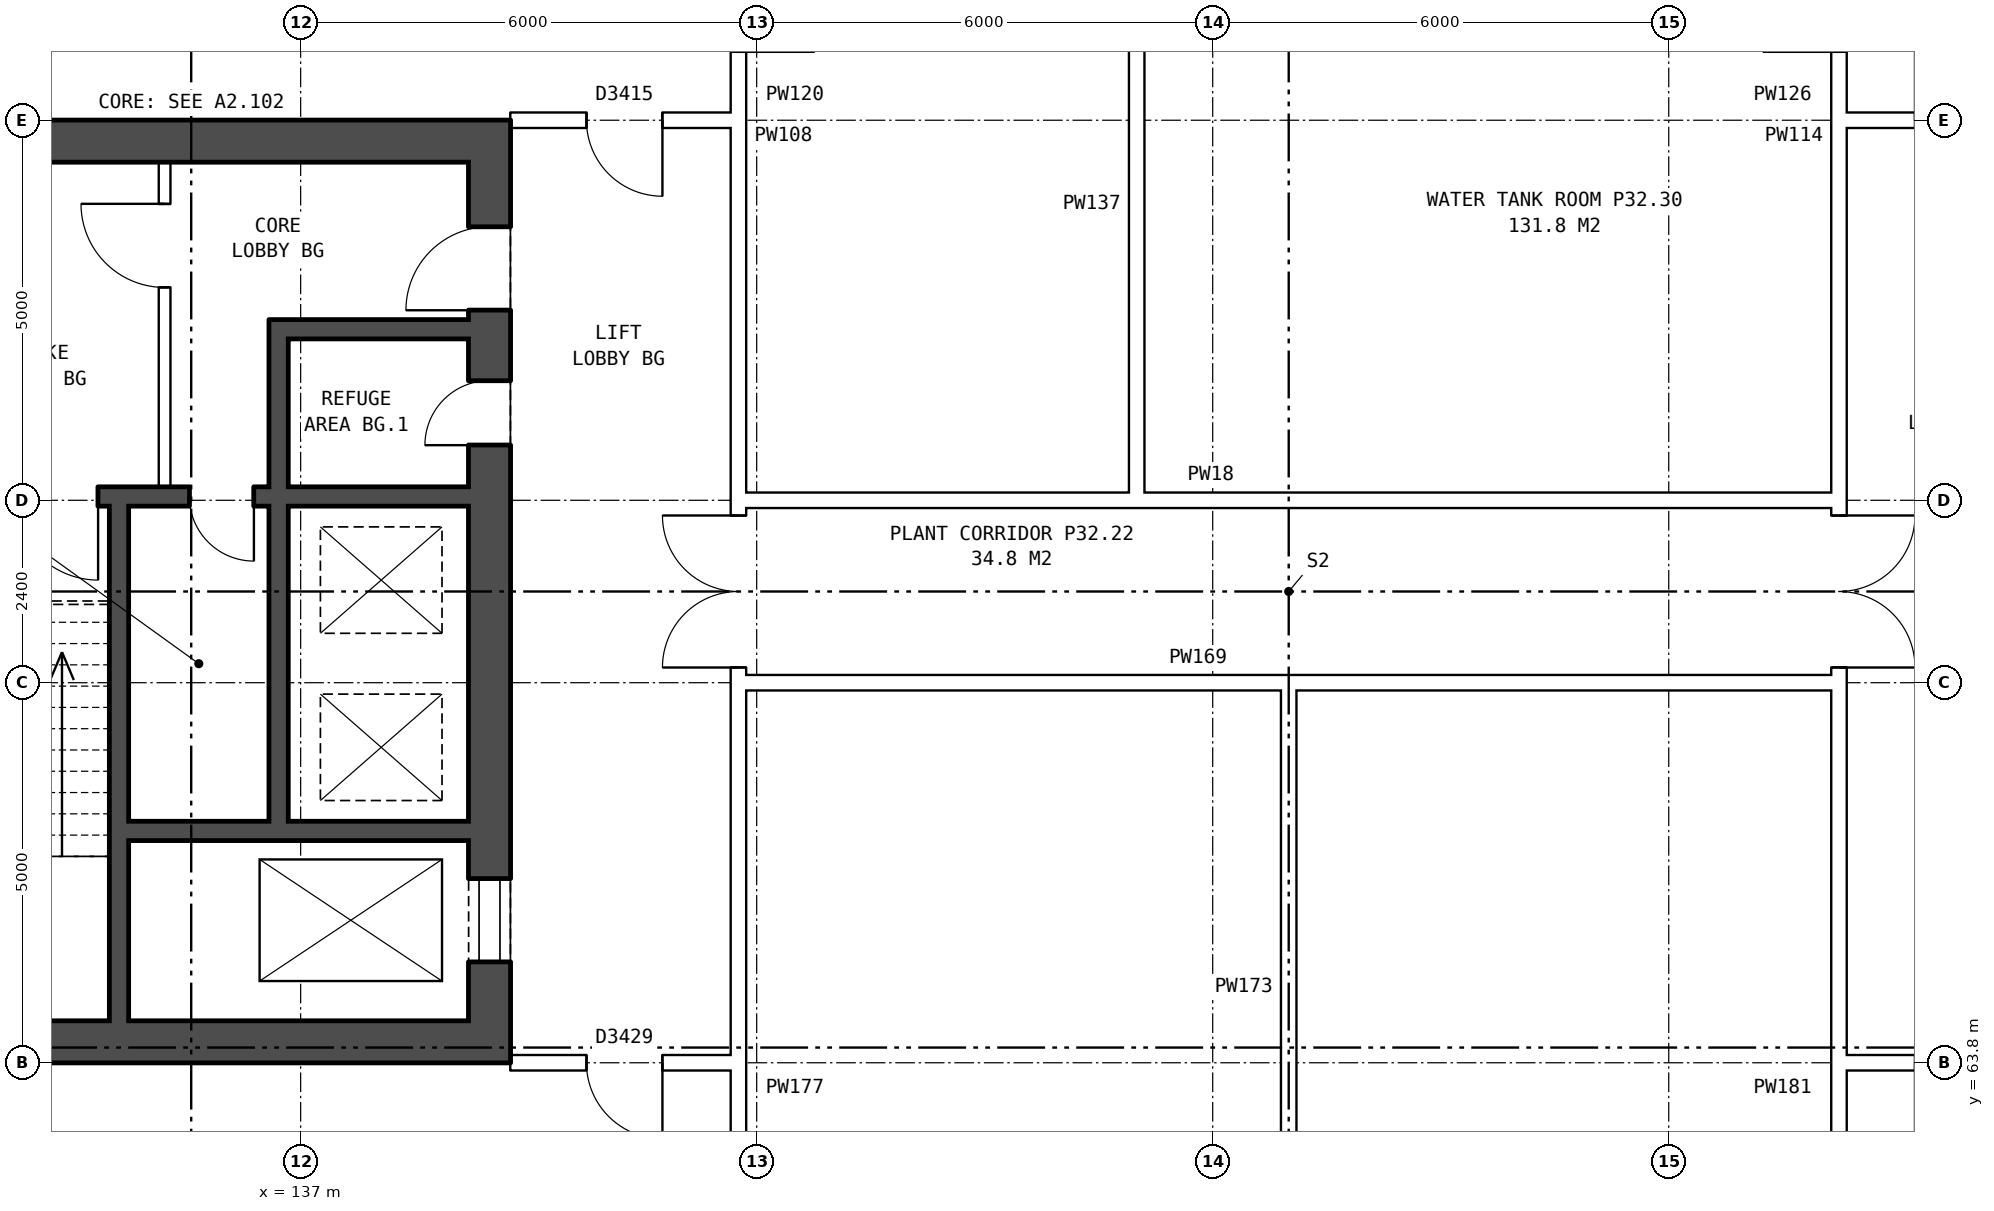
"""IFC4 building model, lengths in metres.
Left out: names, types, materials, properties, quantities, classifications, styles, units other than length and angle.
Written with IfcOpenShell. Run it as: python <this file> out.ifc"""

import sys

from ifc_helpers import new_model, si_unit, direction, frame, frame_2d, origin, place, context, subcontext, project, spatial, rectangle, extrude, element, fill, save


model = new_model("IFC4")
c1 = context("Model", 3, precision=1e-05, world=origin(), true_north=direction((0.0, 1.0)))
c2 = subcontext(c1, "Body", "Model", "MODEL_VIEW")
j1 = project(units=[si_unit("LENGTHUNIT", "METRE"), si_unit("PLANEANGLEUNIT", "RADIAN")], contexts=[c1])
p1 = place(None, origin())
s1 = spatial("IfcSite", under=j1, at=p1, CompositionType="ELEMENT")
p2 = place(p1, origin())
s2 = spatial("IfcBuilding", under=s1, at=p2, CompositionType="ELEMENT")
p3 = place(p2, frame((0.0, 0.0, 115.0)))
s3 = spatial("IfcBuildingStorey", under=s2, at=p3, CompositionType="ELEMENT", Elevation=115.0)
p4 = place(p3, frame((139.485, 63.8, 0.0), z_axis=(0.0, 0.0, 1.0), x_axis=(0.0, 1.0, 0.0)))
e1 = element("IfcWall", 1, at=p4, inside=s3, PredefinedType="SHEAR", context=c2, shape_type="SweptSolid", body=[
    extrude(rectangle(XDim=12.4, YDim=0.55, at=frame_2d((6.2, 0.0))), origin(), (0.0, 0.0, 1.0), 4.2),
])
p5 = place(p4, frame((1.325, 0.0, 0.0)))
e2 = element("IfcOpeningElement", 2, at=p5, cuts=e1, PredefinedType="OPENING", context=c2, shape_type="SweptSolid", body=[
    extrude(rectangle(XDim=1.1, YDim=2.1, at=frame_2d((0.55, 1.05))), frame((0.0, 0.285, 0.0), z_axis=(0.0, -1.0, 0.0), x_axis=(1.0, 0.0, 0.0)), (0.0, 0.0, 1.0), 0.57),
])
p6 = place(p4, frame((9.9, 0.0, 0.0)))
e3 = element("IfcOpeningElement", 3, at=p6, cuts=e1, PredefinedType="OPENING", context=c2, shape_type="SweptSolid", body=[
    extrude(rectangle(XDim=1.1, YDim=2.1, at=frame_2d((0.55, 1.05))), frame((0.0, 0.285, 0.0), z_axis=(0.0, -1.0, 0.0), x_axis=(1.0, 0.0, 0.0)), (0.0, 0.0, 1.0), 0.57),
])
p7 = place(p4, frame((8.125, 0.0, 0.0)))
e4 = element("IfcOpeningElement", 4, at=p7, cuts=e1, PredefinedType="OPENING", context=c2, shape_type="SweptSolid", body=[
    extrude(rectangle(XDim=0.85, YDim=2.1, at=frame_2d((0.425, 1.05))), frame((0.0, 0.285, 0.0), z_axis=(0.0, -1.0, 0.0), x_axis=(1.0, 0.0, 0.0)), (0.0, 0.0, 1.0), 0.57),
])
for number, where, z_axis, x_axis in (
    (5, (139.21, 64.075, 0.0), (0.0, 0.0, 1.0), (-1.0, 0.0, 0.0)),
    (6, (139.21, 75.925, 0.0), (0.0, 0.0, 1.0), (-1.0, 0.0, 0.0)),
):
    element("IfcWall", number, at=place(p3, frame(where, z_axis=z_axis, x_axis=x_axis)), inside=s3, PredefinedType="SHEAR", context=c2, shape_type="SweptSolid", body=[
        extrude(rectangle(XDim=7.3, YDim=0.55, at=frame_2d((3.65, 0.0))), origin(), (0.0, 0.0, 1.0), 4.2),
    ])
p8 = place(p3, frame((139.21, 66.85, 0.0), z_axis=(0.0, 0.0, 1.0), x_axis=(-1.0, 0.0, 0.0)))
e7 = element("IfcWall", 7, at=p8, inside=s3, PredefinedType="SHEAR", context=c2, shape_type="SweptSolid", body=[
    extrude(rectangle(XDim=4.475, YDim=0.25, at=frame_2d((2.237, 0.0))), origin(), (0.0, 0.0, 1.0), 4.2),
])
p9 = place(p3, frame((139.21, 71.25, 0.0), z_axis=(0.0, 0.0, 1.0), x_axis=(-1.0, 0.0, 0.0)))
e8 = element("IfcWall", 8, at=p9, inside=s3, PredefinedType="SHEAR", context=c2, shape_type="SweptSolid", body=[
    extrude(rectangle(XDim=7.3, YDim=0.25, at=frame_2d((3.65, 0.0))), origin(), (0.0, 0.0, 1.0), 4.2),
])
p10 = place(p9, frame((4.875, 0.0, 0.0)))
e9 = element("IfcOpeningElement", 9, at=p10, cuts=e8, PredefinedType="OPENING", context=c2, shape_type="SweptSolid", body=[
    extrude(rectangle(XDim=1.1, YDim=2.1, at=frame_2d((0.55, 1.05))), frame((0.0, 0.135, 0.0), z_axis=(0.0, -1.0, 0.0), x_axis=(1.0, 0.0, 0.0)), (0.0, 0.0, 1.0), 0.27),
])
p11 = place(p9, frame((2.825, 0.0, 0.0)))
e10 = element("IfcOpeningElement", 10, at=p11, cuts=e8, PredefinedType="OPENING", context=c2, shape_type="SweptSolid", body=[
    extrude(rectangle(XDim=0.85, YDim=2.1, at=frame_2d((0.425, 1.05))), frame((0.0, 0.135, 0.0), z_axis=(0.0, -1.0, 0.0), x_axis=(1.0, 0.0, 0.0)), (0.0, 0.0, 1.0), 0.27),
])
p12 = place(p3, frame((139.21, 73.45, 0.0), z_axis=(0.0, 0.0, 1.0), x_axis=(-1.0, 0.0, 0.0)))
e11 = element("IfcWall", 11, at=p12, inside=s3, PredefinedType="SHEAR", context=c2, shape_type="SweptSolid", body=[
    extrude(rectangle(XDim=2.375, YDim=0.25, at=frame_2d((1.188, 0.0))), origin(), (0.0, 0.0, 1.0), 4.2),
])
p13 = place(p3, frame((136.71, 66.975, 0.0), z_axis=(0.0, 0.0, 1.0), x_axis=(0.0, 1.0, 0.0)))
e12 = element("IfcWall", 12, at=p13, inside=s3, PredefinedType="SHEAR", context=c2, shape_type="SweptSolid", body=[
    extrude(rectangle(XDim=4.15, YDim=0.25, at=frame_2d((2.075, 0.0))), origin(), (0.0, 0.0, 1.0), 4.2),
])
p14 = place(p3, frame((136.71, 71.375, 0.0), z_axis=(0.0, 0.0, 1.0), x_axis=(0.0, 1.0, 0.0)))
e13 = element("IfcWall", 13, at=p14, inside=s3, PredefinedType="SHEAR", context=c2, shape_type="SweptSolid", body=[
    extrude(rectangle(XDim=2.2, YDim=0.25, at=frame_2d((1.1, 0.0))), origin(), (0.0, 0.0, 1.0), 4.2),
])
p15 = place(p3, frame((135.21, 71.375, 0.0), z_axis=(0.0, 0.0, 1.0), x_axis=(0.0, 1.0, 0.0)))
e14 = element("IfcWall", 14, at=p15, inside=s3, PredefinedType="PARTITIONING", context=c2, shape_type="SweptSolid", body=[
    extrude(rectangle(XDim=4.275, YDim=0.15, at=frame_2d((2.137, 0.0))), origin(), (0.0, 0.0, 1.0), 4.2),
])
p16 = place(p15, frame((2.625, 0.0, 0.0)))
e15 = element("IfcOpeningElement", 15, at=p16, cuts=e14, PredefinedType="OPENING", context=c2, shape_type="SweptSolid", body=[
    extrude(rectangle(XDim=1.1, YDim=2.1, at=frame_2d((0.55, 1.05))), frame((0.0, 0.085, 0.0), z_axis=(0.0, -1.0, 0.0), x_axis=(1.0, 0.0, 0.0)), (0.0, 0.0, 1.0), 0.17),
])
p17 = place(p3, frame((134.61, 64.35, 0.0), z_axis=(0.0, 0.0, 1.0), x_axis=(0.0, 1.0, 0.0)))
e16 = element("IfcWall", 16, at=p17, inside=s3, PredefinedType="SHEAR", context=c2, shape_type="SweptSolid", body=[
    extrude(rectangle(XDim=6.775, YDim=0.25, at=frame_2d((3.387, 0.0))), origin(), (0.0, 0.0, 1.0), 4.2),
])
p18 = place(p3, frame((142.76, 63.9, 0.0), z_axis=(0.0, 0.0, 1.0), x_axis=(0.0, 1.0, 0.0)))
e17 = element("IfcWall", 17, at=p18, inside=s3, PredefinedType="PARTITIONING", context=c2, shape_type="SweptSolid", body=[
    extrude(rectangle(XDim=12.2, YDim=0.2, at=frame_2d((6.1, 0.0))), origin(), (0.0, 0.0, 1.0), 4.2),
])
p19 = place(p18, frame((5.1, 0.0, 0.0)))
e18 = element("IfcOpeningElement", 18, at=p19, cuts=e17, PredefinedType="OPENING", context=c2, shape_type="SweptSolid", body=[
    extrude(rectangle(XDim=2.0, YDim=2.1, at=frame_2d((1.0, 1.05))), frame((0.0, 0.11, 0.0), z_axis=(0.0, -1.0, 0.0), x_axis=(1.0, 0.0, 0.0)), (0.0, 0.0, 1.0), 0.22),
])
p20 = place(p3, frame((157.24, 63.9, 0.0), z_axis=(0.0, 0.0, 1.0), x_axis=(0.0, 1.0, 0.0)))
e19 = element("IfcWall", 19, at=p20, inside=s3, PredefinedType="PARTITIONING", context=c2, shape_type="SweptSolid", body=[
    extrude(rectangle(XDim=12.2, YDim=0.2, at=frame_2d((6.1, 0.0))), origin(), (0.0, 0.0, 1.0), 4.2),
])
p21 = place(p20, frame((5.1, 0.0, 0.0)))
e20 = element("IfcOpeningElement", 20, at=p21, cuts=e19, PredefinedType="OPENING", context=c2, shape_type="SweptSolid", body=[
    extrude(rectangle(XDim=2.0, YDim=2.1, at=frame_2d((1.0, 1.05))), frame((0.0, 0.11, 0.0), z_axis=(0.0, -1.0, 0.0), x_axis=(1.0, 0.0, 0.0)), (0.0, 0.0, 1.0), 0.22),
])
p22 = place(p3, frame((139.76, 63.8, 0.0), z_axis=(0.0, 0.0, 1.0), x_axis=(1.0, 0.0, 0.0)))
e21 = element("IfcWall", 21, at=p22, inside=s3, PredefinedType="PARTITIONING", context=c2, shape_type="SweptSolid", body=[
    extrude(rectangle(XDim=3.1, YDim=0.2, at=frame_2d((1.55, 0.0))), origin(), (0.0, 0.0, 1.0), 4.2),
])
p23 = place(p22, frame((1.0, 0.0, 0.0)))
e22 = element("IfcOpeningElement", 22, at=p23, cuts=e21, PredefinedType="OPENING", context=c2, shape_type="SweptSolid", body=[
    extrude(rectangle(XDim=1.0, YDim=2.1, at=frame_2d((0.5, 1.05))), frame((0.0, 0.11, 0.0), z_axis=(0.0, -1.0, 0.0), x_axis=(1.0, 0.0, 0.0)), (0.0, 0.0, 1.0), 0.22),
])
p24 = place(p3, frame((157.14, 63.8, 0.0), z_axis=(0.0, 0.0, 1.0), x_axis=(1.0, 0.0, 0.0)))
e23 = element("IfcWall", 23, at=p24, inside=s3, PredefinedType="PARTITIONING", context=c2, shape_type="SweptSolid", body=[
    extrude(rectangle(XDim=3.1, YDim=0.2, at=frame_2d((1.55, 0.0))), origin(), (0.0, 0.0, 1.0), 4.2),
])
p25 = place(p24, frame((1.1, 0.0, 0.0)))
e24 = element("IfcOpeningElement", 24, at=p25, cuts=e23, PredefinedType="OPENING", context=c2, shape_type="SweptSolid", body=[
    extrude(rectangle(XDim=1.0, YDim=2.1, at=frame_2d((0.5, 1.05))), frame((0.0, 0.11, 0.0), z_axis=(0.0, -1.0, 0.0), x_axis=(1.0, 0.0, 0.0)), (0.0, 0.0, 1.0), 0.22),
])
for number, where, z_axis, x_axis in (
    (25, (142.76, 68.8, 0.0), (0.0, 0.0, 1.0), (1.0, 0.0, 0.0)),
    (26, (142.76, 71.2, 0.0), (0.0, 0.0, 1.0), (1.0, 0.0, 0.0)),
):
    element("IfcWall", number, at=place(p3, frame(where, z_axis=z_axis, x_axis=x_axis)), inside=s3, PredefinedType="PARTITIONING", context=c2, shape_type="SweptSolid", body=[
        extrude(rectangle(XDim=14.48, YDim=0.2, at=frame_2d((7.24, 0.0))), origin(), (0.0, 0.0, 1.0), 4.2),
    ])
p26 = place(p3, frame((139.76, 76.2, 0.0), z_axis=(0.0, 0.0, 1.0), x_axis=(1.0, 0.0, 0.0)))
e27 = element("IfcWall", 27, at=p26, inside=s3, PredefinedType="PARTITIONING", context=c2, shape_type="SweptSolid", body=[
    extrude(rectangle(XDim=3.1, YDim=0.2, at=frame_2d((1.55, 0.0))), origin(), (0.0, 0.0, 1.0), 4.2),
])
p27 = place(p26, frame((1.0, 0.0, 0.0)))
e28 = element("IfcOpeningElement", 28, at=p27, cuts=e27, PredefinedType="OPENING", context=c2, shape_type="SweptSolid", body=[
    extrude(rectangle(XDim=1.0, YDim=2.1, at=frame_2d((0.5, 1.05))), frame((0.0, 0.11, 0.0), z_axis=(0.0, -1.0, 0.0), x_axis=(1.0, 0.0, 0.0)), (0.0, 0.0, 1.0), 0.22),
])
p28 = place(p3, frame((157.14, 76.2, 0.0), z_axis=(0.0, 0.0, 1.0), x_axis=(1.0, 0.0, 0.0)))
e29 = element("IfcWall", 29, at=p28, inside=s3, PredefinedType="PARTITIONING", context=c2, shape_type="SweptSolid", body=[
    extrude(rectangle(XDim=3.1, YDim=0.2, at=frame_2d((1.55, 0.0))), origin(), (0.0, 0.0, 1.0), 4.2),
])
p29 = place(p28, frame((1.1, 0.0, 0.0)))
e30 = element("IfcOpeningElement", 30, at=p29, cuts=e29, PredefinedType="OPENING", context=c2, shape_type="SweptSolid", body=[
    extrude(rectangle(XDim=1.0, YDim=2.1, at=frame_2d((0.5, 1.05))), frame((0.0, 0.11, 0.0), z_axis=(0.0, -1.0, 0.0), x_axis=(1.0, 0.0, 0.0)), (0.0, 0.0, 1.0), 0.22),
])
p30 = place(p3, frame((142.76, 60.7, 0.0), z_axis=(0.0, 0.0, 1.0), x_axis=(0.0, 1.0, 0.0)))
e31 = element("IfcWall", 31, at=p30, inside=s3, PredefinedType="PARTITIONING", context=c2, shape_type="SweptSolid", body=[
    extrude(rectangle(XDim=3.2, YDim=0.2, at=frame_2d((1.6, 0.0))), origin(), (0.0, 0.0, 1.0), 4.2),
])
p31 = place(p30, frame((1.1, 0.0, 0.0)))
e32 = element("IfcOpeningElement", 32, at=p31, cuts=e31, PredefinedType="OPENING", context=c2, shape_type="SweptSolid", body=[
    extrude(rectangle(XDim=1.0, YDim=2.1, at=frame_2d((0.5, 1.05))), frame((0.0, 0.11, 0.0), z_axis=(0.0, -1.0, 0.0), x_axis=(1.0, 0.0, 0.0)), (0.0, 0.0, 1.0), 0.22),
])
p32 = place(p3, frame((142.76, 76.1, 0.0), z_axis=(0.0, 0.0, 1.0), x_axis=(0.0, 1.0, 0.0)))
e33 = element("IfcWall", 33, at=p32, inside=s3, PredefinedType="PARTITIONING", context=c2, shape_type="SweptSolid", body=[
    extrude(rectangle(XDim=3.0, YDim=0.2, at=frame_2d((1.5, 0.0))), origin(), (0.0, 0.0, 1.0), 4.2),
])
p33 = place(p32, frame((1.0, 0.0, 0.0)))
e34 = element("IfcOpeningElement", 34, at=p33, cuts=e33, PredefinedType="OPENING", context=c2, shape_type="SweptSolid", body=[
    extrude(rectangle(XDim=1.0, YDim=2.1, at=frame_2d((0.5, 1.05))), frame((0.0, 0.11, 0.0), z_axis=(0.0, -1.0, 0.0), x_axis=(1.0, 0.0, 0.0)), (0.0, 0.0, 1.0), 0.22),
])
p34 = place(p3, frame((148.0, 71.1, 0.0), z_axis=(0.0, 0.0, 1.0), x_axis=(0.0, 1.0, 0.0)))
e35 = element("IfcWall", 35, at=p34, inside=s3, PredefinedType="PARTITIONING", context=c2, shape_type="SweptSolid", body=[
    extrude(rectangle(XDim=8.0, YDim=0.2, at=frame_2d((4.0, 0.0))), origin(), (0.0, 0.0, 1.0), 4.2),
])
p35 = place(p3, frame((150.0, 60.7, 0.0), z_axis=(0.0, 0.0, 1.0), x_axis=(0.0, 1.0, 0.0)))
e36 = element("IfcWall", 36, at=p35, inside=s3, PredefinedType="PARTITIONING", context=c2, shape_type="SweptSolid", body=[
    extrude(rectangle(XDim=8.2, YDim=0.2, at=frame_2d((4.1, 0.0))), origin(), (0.0, 0.0, 1.0), 4.2),
])
p36 = place(p3, frame((157.24, 60.7, 0.0), z_axis=(0.0, 0.0, 1.0), x_axis=(0.0, 1.0, 0.0)))
e37 = element("IfcWall", 37, at=p36, inside=s3, PredefinedType="PARTITIONING", context=c2, shape_type="SweptSolid", body=[
    extrude(rectangle(XDim=3.2, YDim=0.2, at=frame_2d((1.6, 0.0))), origin(), (0.0, 0.0, 1.0), 4.2),
])
p37 = place(p36, frame((1.1, 0.0, 0.0)))
e38 = element("IfcOpeningElement", 38, at=p37, cuts=e37, PredefinedType="OPENING", context=c2, shape_type="SweptSolid", body=[
    extrude(rectangle(XDim=1.0, YDim=2.1, at=frame_2d((0.5, 1.05))), frame((0.0, 0.11, 0.0), z_axis=(0.0, -1.0, 0.0), x_axis=(1.0, 0.0, 0.0)), (0.0, 0.0, 1.0), 0.22),
])
p38 = place(p3, frame((157.24, 76.1, 0.0), z_axis=(0.0, 0.0, 1.0), x_axis=(0.0, 1.0, 0.0)))
e39 = element("IfcWall", 39, at=p38, inside=s3, PredefinedType="PARTITIONING", context=c2, shape_type="SweptSolid", body=[
    extrude(rectangle(XDim=3.0, YDim=0.2, at=frame_2d((1.5, 0.0))), origin(), (0.0, 0.0, 1.0), 4.2),
])
p39 = place(p38, frame((1.0, 0.0, 0.0)))
e40 = element("IfcOpeningElement", 40, at=p39, cuts=e39, PredefinedType="OPENING", context=c2, shape_type="SweptSolid", body=[
    extrude(rectangle(XDim=1.0, YDim=2.1, at=frame_2d((0.5, 1.05))), frame((0.0, 0.11, 0.0), z_axis=(0.0, -1.0, 0.0), x_axis=(1.0, 0.0, 0.0)), (0.0, 0.0, 1.0), 0.22),
])
p40 = place(p5, origin())
e41 = element("IfcDoor", 41, at=p40, inside=s3, OperationType="DOUBLE_DOOR_SLIDING", PredefinedType="DOOR", context=c2, shape_type="SweptSolid", body=[
    extrude(rectangle(XDim=1.1, YDim=2.1, at=frame_2d((0.55, 1.05))), frame((0.0, 0.26, 0.0), z_axis=(0.0, -1.0, 0.0), x_axis=(1.0, 0.0, 0.0)), (0.0, 0.0, 1.0), 0.05),
])
fill(e2, e41)
p41 = place(p6, origin())
e42 = element("IfcDoor", 42, at=p41, inside=s3, OperationType="SINGLE_SWING_LEFT", PredefinedType="DOOR", context=c2, shape_type="SweptSolid", body=[
    extrude(rectangle(XDim=1.1, YDim=2.1, at=frame_2d((0.55, 1.05))), frame((0.0, 0.26, 0.0), z_axis=(0.0, -1.0, 0.0), x_axis=(1.0, 0.0, 0.0)), (0.0, 0.0, 1.0), 0.05),
])
fill(e3, e42)
p42 = place(p16, origin())
e43 = element("IfcDoor", 43, at=p42, inside=s3, OperationType="SINGLE_SWING_RIGHT", PredefinedType="DOOR", context=c2, shape_type="SweptSolid", body=[
    extrude(rectangle(XDim=1.1, YDim=2.1, at=frame_2d((0.55, 1.05))), frame((0.0, 0.025, 0.0), z_axis=(0.0, -1.0, 0.0), x_axis=(1.0, 0.0, 0.0)), (0.0, 0.0, 1.0), 0.05),
])
fill(e15, e43)
p43 = place(p10, origin())
e44 = element("IfcDoor", 44, at=p43, inside=s3, OperationType="SINGLE_SWING_LEFT", PredefinedType="DOOR", context=c2, shape_type="SweptSolid", body=[
    extrude(rectangle(XDim=1.1, YDim=2.1, at=frame_2d((0.55, 1.05))), frame((0.0, 0.025, 0.0), z_axis=(0.0, -1.0, 0.0), x_axis=(1.0, 0.0, 0.0)), (0.0, 0.0, 1.0), 0.05),
])
fill(e9, e44)
p44 = place(p7, origin())
e45 = element("IfcDoor", 45, at=p44, inside=s3, OperationType="SINGLE_SWING_LEFT", PredefinedType="DOOR", context=c2, shape_type="SweptSolid", body=[
    extrude(rectangle(XDim=0.85, YDim=2.1, at=frame_2d((0.425, 1.05))), frame((0.0, 0.26, 0.0), z_axis=(0.0, -1.0, 0.0), x_axis=(1.0, 0.0, 0.0)), (0.0, 0.0, 1.0), 0.05),
])
fill(e4, e45)
p45 = place(p11, origin())
e46 = element("IfcDoor", 46, at=p45, inside=s3, OperationType="SINGLE_SWING_LEFT", PredefinedType="DOOR", context=c2, shape_type="SweptSolid", body=[
    extrude(rectangle(XDim=0.85, YDim=2.1, at=frame_2d((0.425, 1.05))), frame((0.0, 0.025, 0.0), z_axis=(0.0, -1.0, 0.0), x_axis=(1.0, 0.0, 0.0)), (0.0, 0.0, 1.0), 0.05),
])
fill(e10, e46)
p46 = place(p19, origin())
e47 = element("IfcDoor", 47, at=p46, inside=s3, OperationType="DOUBLE_DOOR_SINGLE_SWING", PredefinedType="DOOR", context=c2, shape_type="SweptSolid", body=[
    extrude(rectangle(XDim=2.0, YDim=2.1, at=frame_2d((1.0, 1.05))), frame((0.0, 0.025, 0.0), z_axis=(0.0, -1.0, 0.0), x_axis=(1.0, 0.0, 0.0)), (0.0, 0.0, 1.0), 0.05),
])
fill(e18, e47)
p47 = place(p21, frame((2.0, 0.0, 0.0), z_axis=(0.0, 0.0, 1.0), x_axis=(-1.0, 0.0, 0.0)))
e48 = element("IfcDoor", 48, at=p47, inside=s3, OperationType="DOUBLE_DOOR_SINGLE_SWING", PredefinedType="DOOR", context=c2, shape_type="SweptSolid", body=[
    extrude(rectangle(XDim=2.0, YDim=2.1, at=frame_2d((1.0, 1.05))), frame((0.0, 0.025, 0.0), z_axis=(0.0, -1.0, 0.0), x_axis=(1.0, 0.0, 0.0)), (0.0, 0.0, 1.0), 0.05),
])
fill(e20, e48)
p48 = place(p23, frame((1.0, 0.0, 0.0), z_axis=(0.0, 0.0, 1.0), x_axis=(-1.0, 0.0, 0.0)))
e49 = element("IfcDoor", 49, at=p48, inside=s3, OperationType="SINGLE_SWING_LEFT", PredefinedType="DOOR", context=c2, shape_type="SweptSolid", body=[
    extrude(rectangle(XDim=1.0, YDim=2.1, at=frame_2d((0.5, 1.05))), frame((0.0, 0.025, 0.0), z_axis=(0.0, -1.0, 0.0), x_axis=(1.0, 0.0, 0.0)), (0.0, 0.0, 1.0), 0.05),
])
fill(e22, e49)
p49 = place(p27, frame((1.0, 0.0, 0.0), z_axis=(0.0, 0.0, 1.0), x_axis=(-1.0, 0.0, 0.0)))
e50 = element("IfcDoor", 50, at=p49, inside=s3, OperationType="SINGLE_SWING_LEFT", PredefinedType="DOOR", context=c2, shape_type="SweptSolid", body=[
    extrude(rectangle(XDim=1.0, YDim=2.1, at=frame_2d((0.5, 1.05))), frame((0.0, 0.025, 0.0), z_axis=(0.0, -1.0, 0.0), x_axis=(1.0, 0.0, 0.0)), (0.0, 0.0, 1.0), 0.05),
])
fill(e28, e50)
save(model, sys.argv[1])
